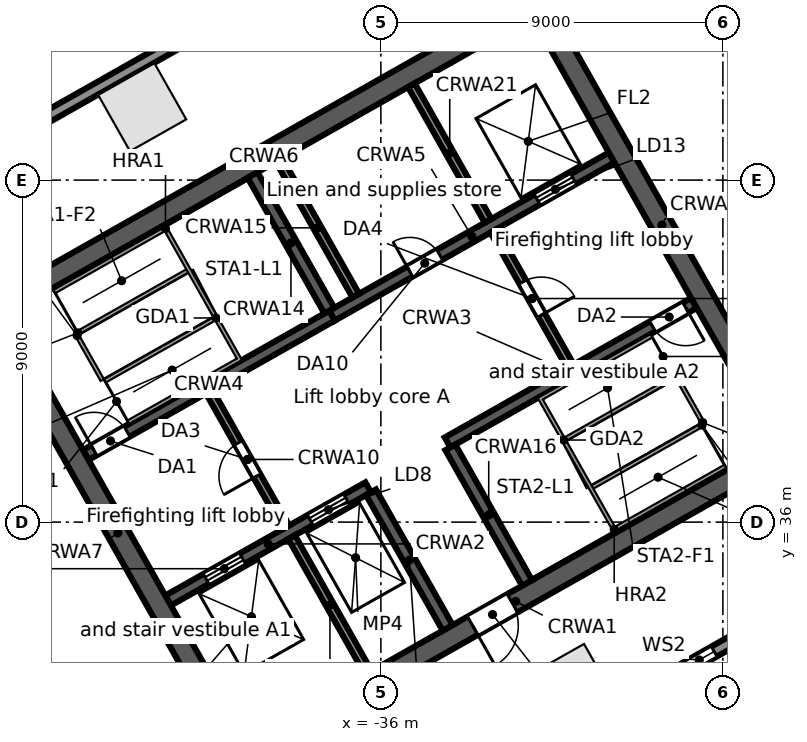
"""IFC4 building model, lengths in metres.
Left out: names, types, materials, properties, quantities, classifications, styles, units other than length and angle.
Written with IfcOpenShell. Run it as: python <this file> out.ifc"""

import sys

from ifc_helpers import new_model, si_unit, direction, frame, frame_2d, origin, origin_2d, place, context, subcontext, project, spatial, rectangle, extrude, element, fill, save


model = new_model("IFC4")
c1 = context("Model", 3, precision=1e-05, world=origin(), true_north=direction((0.0, 1.0)))
c2 = subcontext(c1, "Body", "Model", "MODEL_VIEW")
j1 = project(units=[si_unit("LENGTHUNIT", "METRE"), si_unit("PLANEANGLEUNIT", "RADIAN")], contexts=[c1])
p1 = place(None, origin())
s1 = spatial("IfcSite", under=j1, at=p1, CompositionType="ELEMENT")
p2 = place(p1, origin())
s2 = spatial("IfcBuilding", under=s1, at=p2, CompositionType="ELEMENT")
p3 = place(p2, frame((0.0, 0.0, 136.7)))
s3 = spatial("IfcBuildingStorey", under=s2, at=p3, CompositionType="ELEMENT", Elevation=136.7)
for number, where, z_axis, x_axis in (
    (1, (-42.28, 46.919, 0.0), (0.0, 0.0, 1.0), (-0.87, -0.492, 0.0)),
    (2, (-30.976, 31.635, 0.0), (0.0, 0.0, 1.0), (0.87, 0.492, 0.0)),
):
    element("IfcColumn", number, at=place(p3, frame(where, z_axis=z_axis, x_axis=x_axis)), inside=s3, PredefinedType="COLUMN", context=c2, shape_type="SweptSolid", body=[
        extrude(rectangle(XDim=1.7, YDim=1.7, at=origin_2d()), origin(), (0.0, 0.0, 1.0), 4.4),
    ])
p4 = place(p3, frame((-58.745, 38.764, 0.0), z_axis=(0.0, 0.0, 1.0), x_axis=(0.870355811726, 0.492423355453, 0.0)))
e3 = element("IfcWall", 3, at=p4, inside=s3, PredefinedType="STANDARD", context=c2, shape_type="SweptSolid", body=[
    extrude(rectangle(XDim=64.025, YDim=0.3, at=frame_2d((32.013, 0.0))), origin(), (0.0, 0.0, 1.0), 4.08),
])
p5 = place(p4, frame((60.122, 0.0, 0.6)))
e4 = element("IfcOpeningElement", 4, at=p5, cuts=e3, PredefinedType="OPENING", context=c2, shape_type="SweptSolid", body=[
    extrude(rectangle(XDim=0.9, YDim=2.8, at=frame_2d((0.45, 1.4))), frame((0.0, 0.16, 0.0), z_axis=(0.0, -1.0, 0.0), x_axis=(1.0, 0.0, 0.0)), (0.0, 0.0, 1.0), 0.32),
])
p6 = place(p4, frame((50.992, 0.0, 0.6)))
e5 = element("IfcOpeningElement", 5, at=p6, cuts=e3, PredefinedType="OPENING", context=c2, shape_type="SweptSolid", body=[
    extrude(rectangle(XDim=0.9, YDim=2.8, at=frame_2d((0.45, 1.4))), frame((0.0, 0.16, 0.0), z_axis=(0.0, -1.0, 0.0), x_axis=(1.0, 0.0, 0.0)), (0.0, 0.0, 1.0), 0.32),
])
p7 = place(p4, frame((41.862, 0.0, 0.6)))
e6 = element("IfcOpeningElement", 6, at=p7, cuts=e3, PredefinedType="OPENING", context=c2, shape_type="SweptSolid", body=[
    extrude(rectangle(XDim=0.9, YDim=2.8, at=frame_2d((0.45, 1.4))), frame((0.0, 0.16, 0.0), z_axis=(0.0, -1.0, 0.0), x_axis=(1.0, 0.0, 0.0)), (0.0, 0.0, 1.0), 0.32),
])
p8 = place(p4, frame((32.732, 0.0, 0.6)))
e7 = element("IfcOpeningElement", 7, at=p8, cuts=e3, PredefinedType="OPENING", context=c2, shape_type="SweptSolid", body=[
    extrude(rectangle(XDim=0.9, YDim=2.8, at=frame_2d((0.45, 1.4))), frame((0.0, 0.16, 0.0), z_axis=(0.0, -1.0, 0.0), x_axis=(1.0, 0.0, 0.0)), (0.0, 0.0, 1.0), 0.32),
])
p9 = place(p4, frame((23.602, 0.0, 0.6)))
e8 = element("IfcOpeningElement", 8, at=p9, cuts=e3, PredefinedType="OPENING", context=c2, shape_type="SweptSolid", body=[
    extrude(rectangle(XDim=0.9, YDim=2.8, at=frame_2d((0.45, 1.4))), frame((0.0, 0.16, 0.0), z_axis=(0.0, -1.0, 0.0), x_axis=(1.0, 0.0, 0.0)), (0.0, 0.0, 1.0), 0.32),
])
p10 = place(p4, frame((14.472, 0.0, 0.6)))
e9 = element("IfcOpeningElement", 9, at=p10, cuts=e3, PredefinedType="OPENING", context=c2, shape_type="SweptSolid", body=[
    extrude(rectangle(XDim=0.9, YDim=2.8, at=frame_2d((0.45, 1.4))), frame((0.0, 0.16, 0.0), z_axis=(0.0, -1.0, 0.0), x_axis=(1.0, 0.0, 0.0)), (0.0, 0.0, 1.0), 0.32),
])
p11 = place(p4, frame((5.342, 0.0, 0.6)))
e10 = element("IfcOpeningElement", 10, at=p11, cuts=e3, PredefinedType="OPENING", context=c2, shape_type="SweptSolid", body=[
    extrude(rectangle(XDim=0.9, YDim=2.8, at=frame_2d((0.45, 1.4))), frame((0.0, 0.16, 0.0), z_axis=(0.0, -1.0, 0.0), x_axis=(1.0, 0.0, 0.0)), (0.0, 0.0, 1.0), 0.32),
])
p12 = place(p3, frame((-44.109, 26.504, 0.0), z_axis=(0.0, 0.0, 1.0), x_axis=(-0.857169502585, 0.515034410344, 0.0)))
e11 = element("IfcWall", 11, at=p12, inside=s3, PredefinedType="STANDARD", context=c2, shape_type="SweptSolid", body=[
    extrude(rectangle(XDim=17.127, YDim=0.3, at=frame_2d((8.563, 0.0))), origin(), (0.0, 0.0, 1.0), 4.08),
])
p13 = place(p12, frame((13.403, 0.0, 0.6)))
e12 = element("IfcOpeningElement", 12, at=p13, cuts=e11, PredefinedType="OPENING", context=c2, shape_type="SweptSolid", body=[
    extrude(rectangle(XDim=0.9, YDim=2.8, at=frame_2d((0.45, 1.4))), frame((0.0, 0.16, 0.0), z_axis=(0.0, -1.0, 0.0), x_axis=(1.0, 0.0, 0.0)), (0.0, 0.0, 1.0), 0.32),
])
p14 = place(p12, frame((4.903, 0.0, 0.6)))
e13 = element("IfcOpeningElement", 13, at=p14, cuts=e11, PredefinedType="OPENING", context=c2, shape_type="SweptSolid", body=[
    extrude(rectangle(XDim=0.9, YDim=2.8, at=frame_2d((0.45, 1.4))), frame((0.0, 0.16, 0.0), z_axis=(0.0, -1.0, 0.0), x_axis=(1.0, 0.0, 0.0)), (0.0, 0.0, 1.0), 0.32),
])
p15 = place(p3, frame((-0.055, 47.969, 0.0), z_axis=(0.0, 0.0, 1.0), x_axis=(-0.870355730478, -0.492423499058, 0.0)))
e14 = element("IfcWall", 14, at=p15, inside=s3, PredefinedType="STANDARD", context=c2, shape_type="SweptSolid", body=[
    extrude(rectangle(XDim=43.75, YDim=0.3, at=frame_2d((21.875, 0.0))), origin(), (0.0, 0.0, 1.0), 4.08),
])
p16 = place(p15, frame((39.977, 0.0, 0.6)))
e15 = element("IfcOpeningElement", 15, at=p16, cuts=e14, PredefinedType="OPENING", context=c2, shape_type="SweptSolid", body=[
    extrude(rectangle(XDim=0.9, YDim=2.8, at=frame_2d((0.45, 1.4))), frame((0.0, 0.16, 0.0), z_axis=(0.0, -1.0, 0.0), x_axis=(1.0, 0.0, 0.0)), (0.0, 0.0, 1.0), 0.32),
])
p17 = place(p15, frame((31.222, 0.0, 0.6)))
e16 = element("IfcOpeningElement", 16, at=p17, cuts=e14, PredefinedType="OPENING", context=c2, shape_type="SweptSolid", body=[
    extrude(rectangle(XDim=0.9, YDim=2.8, at=frame_2d((0.45, 1.4))), frame((0.0, 0.16, 0.0), z_axis=(0.0, -1.0, 0.0), x_axis=(1.0, 0.0, 0.0)), (0.0, 0.0, 1.0), 0.32),
])
p18 = place(p15, frame((22.468, 0.0, 0.6)))
e17 = element("IfcOpeningElement", 17, at=p18, cuts=e14, PredefinedType="OPENING", context=c2, shape_type="SweptSolid", body=[
    extrude(rectangle(XDim=0.9, YDim=2.8, at=frame_2d((0.45, 1.4))), frame((0.0, 0.16, 0.0), z_axis=(0.0, -1.0, 0.0), x_axis=(1.0, 0.0, 0.0)), (0.0, 0.0, 1.0), 0.32),
])
p19 = place(p15, frame((13.713, 0.0, 0.6)))
e18 = element("IfcOpeningElement", 18, at=p19, cuts=e14, PredefinedType="OPENING", context=c2, shape_type="SweptSolid", body=[
    extrude(rectangle(XDim=0.9, YDim=2.8, at=frame_2d((0.45, 1.4))), frame((0.0, 0.16, 0.0), z_axis=(0.0, -1.0, 0.0), x_axis=(1.0, 0.0, 0.0)), (0.0, 0.0, 1.0), 0.32),
])
p20 = place(p15, frame((4.959, 0.0, 0.6)))
e19 = element("IfcOpeningElement", 19, at=p20, cuts=e14, PredefinedType="OPENING", context=c2, shape_type="SweptSolid", body=[
    extrude(rectangle(XDim=0.9, YDim=2.8, at=frame_2d((0.45, 1.4))), frame((0.0, 0.16, 0.0), z_axis=(0.0, -1.0, 0.0), x_axis=(1.0, 0.0, 0.0)), (0.0, 0.0, 1.0), 0.32),
])
p21 = place(p3, frame((-39.85, 29.727, 0.0), z_axis=(0.0, 0.0, 1.0), x_axis=(0.870359753402, 0.492416388494, 0.0)))
e20 = element("IfcWall", 20, at=p21, inside=s3, PredefinedType="SOLIDWALL", context=c2, shape_type="SweptSolid", body=[
    extrude(rectangle(XDim=17.0, YDim=0.55, at=frame_2d((8.5, 0.0))), origin(), (0.0, 0.0, 1.0), 4.08),
])
p22 = place(p21, frame((7.2, 0.0, 0.0)))
e21 = element("IfcOpeningElement", 21, at=p22, cuts=e20, PredefinedType="OPENING", context=c2, shape_type="SweptSolid", body=[
    extrude(rectangle(XDim=1.2, YDim=2.1, at=frame_2d((0.6, 1.05))), frame((0.0, 0.285, 0.0), z_axis=(0.0, -1.0, 0.0), x_axis=(1.0, 0.0, 0.0)), (0.0, 0.0, 1.0), 0.57),
])
p23 = place(p3, frame((-41.6, 33.936, 0.0), z_axis=(0.0, 0.0, 1.0), x_axis=(0.870348557882, 0.492436176365, 0.0)))
e22 = element("IfcWall", 22, at=p23, inside=s3, PredefinedType="SOLIDWALL", context=c2, shape_type="SweptSolid", body=[
    extrude(rectangle(XDim=6.05, YDim=0.3, at=frame_2d((3.025, 0.0))), origin(), (0.0, 0.0, 1.0), 4.08),
])
p24 = place(p23, frame((1.15, 0.0, 0.0)))
e23 = element("IfcOpeningElement", 23, at=p24, cuts=e22, PredefinedType="OPENING", context=c2, shape_type="SweptSolid", body=[
    extrude(rectangle(XDim=1.1, YDim=2.1, at=frame_2d((0.55, 1.05))), frame((0.0, 0.16, 0.0), z_axis=(0.0, -1.0, 0.0), x_axis=(1.0, 0.0, 0.0)), (0.0, 0.0, 1.0), 0.32),
])
p25 = place(p23, frame((4.3, 0.0, 0.0)))
e24 = element("IfcOpeningElement", 24, at=p25, cuts=e22, PredefinedType="OPENING", context=c2, shape_type="SweptSolid", body=[
    extrude(rectangle(XDim=1.1, YDim=2.1, at=frame_2d((0.55, 1.05))), frame((0.0, 0.16, 0.0), z_axis=(0.0, -1.0, 0.0), x_axis=(1.0, 0.0, 0.0)), (0.0, 0.0, 1.0), 0.32),
])
p26 = place(p3, frame((-34.245, 38.097, 0.0), z_axis=(0.0, 0.0, 1.0), x_axis=(0.870360741098, 0.49241464271, 0.0)))
e25 = element("IfcWall", 25, at=p26, inside=s3, PredefinedType="SOLIDWALL", context=c2, shape_type="SweptSolid", body=[
    extrude(rectangle(XDim=7.45, YDim=0.3, at=frame_2d((3.725, 0.0))), origin(), (0.0, 0.0, 1.0), 4.08),
])
p27 = place(p26, frame((6.2, 0.0, 0.0)))
e26 = element("IfcOpeningElement", 26, at=p27, cuts=e25, PredefinedType="OPENING", context=c2, shape_type="SweptSolid", body=[
    extrude(rectangle(XDim=1.0, YDim=2.1, at=frame_2d((0.5, 1.05))), frame((0.0, 0.16, 0.0), z_axis=(0.0, -1.0, 0.0), x_axis=(1.0, 0.0, 0.0)), (0.0, 0.0, 1.0), 0.32),
])
p28 = place(p3, frame((-43.766, 37.766, 0.0), z_axis=(0.0, 0.0, 1.0), x_axis=(0.870346696097, 0.492439466932, 0.0)))
e27 = element("IfcWall", 27, at=p28, inside=s3, PredefinedType="SOLIDWALL", context=c2, shape_type="SweptSolid", body=[
    extrude(rectangle(XDim=7.45, YDim=0.3, at=frame_2d((3.725, 0.0))), origin(), (0.0, 0.0, 1.0), 4.08),
])
p29 = place(p28, frame((0.25, 0.0, 0.0)))
e28 = element("IfcOpeningElement", 28, at=p29, cuts=e27, PredefinedType="OPENING", context=c2, shape_type="SweptSolid", body=[
    extrude(rectangle(XDim=1.0, YDim=2.1, at=frame_2d((0.5, 1.05))), frame((0.0, 0.16, 0.0), z_axis=(0.0, -1.0, 0.0), x_axis=(1.0, 0.0, 0.0)), (0.0, 0.0, 1.0), 0.32),
])
p30 = place(p3, frame((-37.282, 41.435, 0.0), z_axis=(0.0, 0.0, 1.0), x_axis=(0.870359895813, 0.492416136779, 0.0)))
e29 = element("IfcWall", 29, at=p30, inside=s3, PredefinedType="SOLIDWALL", context=c2, shape_type="SweptSolid", body=[
    extrude(rectangle(XDim=8.45, YDim=0.3, at=frame_2d((4.225, 0.0))), origin(), (0.0, 0.0, 1.0), 4.08),
])
p31 = place(p30, frame((6.2, 0.0, 0.0)))
e30 = element("IfcOpeningElement", 30, at=p31, cuts=e29, PredefinedType="OPENING", context=c2, shape_type="SweptSolid", body=[
    extrude(rectangle(XDim=1.1, YDim=2.1, at=frame_2d((0.55, 1.05))), frame((0.0, 0.16, 0.0), z_axis=(0.0, -1.0, 0.0), x_axis=(1.0, 0.0, 0.0)), (0.0, 0.0, 1.0), 0.32),
])
p32 = place(p30, frame((2.35, 0.0, 0.0)))
e31 = element("IfcOpeningElement", 31, at=p32, cuts=e29, PredefinedType="OPENING", context=c2, shape_type="SweptSolid", body=[
    extrude(rectangle(XDim=0.9, YDim=2.1, at=frame_2d((0.45, 1.05))), frame((0.0, 0.16, 0.0), z_axis=(0.0, -1.0, 0.0), x_axis=(1.0, 0.0, 0.0)), (0.0, 0.0, 1.0), 0.32),
])
p33 = place(p3, frame((-46.473, 41.434, 0.0), z_axis=(0.0, 0.0, 1.0), x_axis=(0.870359753402, 0.492416388494, 0.0)))
e32 = element("IfcWall", 32, at=p33, inside=s3, PredefinedType="SOLIDWALL", context=c2, shape_type="SweptSolid", body=[
    extrude(rectangle(XDim=17.0, YDim=0.55, at=frame_2d((8.5, 0.0))), origin(), (0.0, 0.0, 1.0), 4.08),
])
p34 = place(p3, frame((-46.098, 41.33, 0.0), z_axis=(0.0, 0.0, 1.0), x_axis=(0.492418910884, -0.870358326325, 0.0)))
e33 = element("IfcWall", 33, at=p34, inside=s3, PredefinedType="SOLIDWALL", context=c2, shape_type="SweptSolid", body=[
    extrude(rectangle(XDim=12.9, YDim=0.55, at=frame_2d((6.45, 0.0))), origin(), (0.0, 0.0, 1.0), 4.08),
])
p35 = place(p3, frame((-38.349, 35.603, 0.0), z_axis=(0.0, 0.0, 1.0), x_axis=(0.492382931784, -0.870378681085, 0.0)))
e34 = element("IfcWall", 34, at=p35, inside=s3, PredefinedType="SOLIDWALL", context=c2, shape_type="SweptSolid", body=[
    extrude(rectangle(XDim=4.1, YDim=0.2, at=frame_2d((2.05, 0.0))), origin(), (0.0, 0.0, 1.0), 4.08),
])
p36 = place(p3, frame((-40.516, 39.433, 0.0), z_axis=(0.0, 0.0, 1.0), x_axis=(0.492453559952, -0.87033872216, 0.0)))
e35 = element("IfcWall", 35, at=p36, inside=s3, PredefinedType="PARTITIONING", context=c2, shape_type="SweptSolid", body=[
    extrude(rectangle(XDim=4.1, YDim=0.2, at=frame_2d((2.05, 0.0))), origin(), (0.0, 0.0, 1.0), 4.08),
])
p37 = place(p36, frame((1.55, 0.0, 0.0)))
e36 = element("IfcOpeningElement", 36, at=p37, cuts=e35, PredefinedType="OPENING", context=c2, shape_type="SweptSolid", body=[
    extrude(rectangle(XDim=1.0, YDim=2.1, at=frame_2d((0.5, 1.05))), frame((0.0, 0.11, 0.0), z_axis=(0.0, -1.0, 0.0), x_axis=(1.0, 0.0, 0.0)), (0.0, 0.0, 1.0), 0.22),
])
p38 = place(p3, frame((-36.26, 36.785, 0.0), z_axis=(0.0, 0.0, 1.0), x_axis=(0.492408451753, -0.87036424366, 0.0)))
e37 = element("IfcWall", 37, at=p38, inside=s3, PredefinedType="SOLIDWALL", context=c2, shape_type="SweptSolid", body=[
    extrude(rectangle(XDim=4.1, YDim=0.3, at=frame_2d((2.05, 0.0))), origin(), (0.0, 0.0, 1.0), 4.08),
])
p39 = place(p3, frame((-39.375, 45.134, 0.0), z_axis=(0.0, 0.0, 1.0), x_axis=(0.492428039142, -0.870353161807, 0.0)))
e38 = element("IfcWall", 38, at=p39, inside=s3, PredefinedType="SOLIDWALL", context=c2, shape_type="SweptSolid", body=[
    extrude(rectangle(XDim=4.1, YDim=0.3, at=frame_2d((2.05, 0.0))), origin(), (0.0, 0.0, 1.0), 4.08),
])
p40 = place(p3, frame((-38.679, 45.527, 0.0), z_axis=(0.0, 0.0, 1.0), x_axis=(0.492453559952, -0.87033872216, 0.0)))
e39 = element("IfcWall", 39, at=p40, inside=s3, PredefinedType="SOLIDWALL", context=c2, shape_type="SweptSolid", body=[
    extrude(rectangle(XDim=4.1, YDim=0.2, at=frame_2d((2.05, 0.0))), origin(), (0.0, 0.0, 1.0), 4.08),
])
p41 = place(p3, frame((-34.171, 37.967, 0.0), z_axis=(0.0, 0.0, 1.0), x_axis=(0.492382931784, -0.870378681085, 0.0)))
e40 = element("IfcWall", 40, at=p41, inside=s3, PredefinedType="SOLIDWALL", context=c2, shape_type="SweptSolid", body=[
    extrude(rectangle(XDim=4.1, YDim=0.3, at=frame_2d((2.05, 0.0))), origin(), (0.0, 0.0, 1.0), 4.08),
])
p42 = place(p3, frame((-33.031, 43.667, 0.0), z_axis=(0.0, 0.0, 1.0), x_axis=(0.492408451753, -0.87036424366, 0.0)))
e41 = element("IfcWall", 41, at=p42, inside=s3, PredefinedType="PARTITIONING", context=c2, shape_type="SweptSolid", body=[
    extrude(rectangle(XDim=4.1, YDim=0.2, at=frame_2d((2.05, 0.0))), origin(), (0.0, 0.0, 1.0), 4.08),
])
p43 = place(p42, frame((1.55, 0.0, 0.0)))
e42 = element("IfcOpeningElement", 42, at=p43, cuts=e41, PredefinedType="OPENING", context=c2, shape_type="SweptSolid", body=[
    extrude(rectangle(XDim=1.0, YDim=2.1, at=frame_2d((0.5, 1.05))), frame((0.0, 0.11, 0.0), z_axis=(0.0, -1.0, 0.0), x_axis=(1.0, 0.0, 0.0)), (0.0, 0.0, 1.0), 0.22),
])
p44 = place(p3, frame((-35.197, 47.497, 0.0), z_axis=(0.0, 0.0, 1.0), x_axis=(0.492453559952, -0.87033872216, 0.0)))
e43 = element("IfcWall", 43, at=p44, inside=s3, PredefinedType="SOLIDWALL", context=c2, shape_type="SweptSolid", body=[
    extrude(rectangle(XDim=4.1, YDim=0.2, at=frame_2d((2.05, 0.0))), origin(), (0.0, 0.0, 1.0), 4.08),
])
p45 = place(p3, frame((-31.781, 49.43, 0.0), z_axis=(0.0, 0.0, 1.0), x_axis=(0.492427022044, -0.870353737259, 0.0)))
e44 = element("IfcWall", 44, at=p45, inside=s3, PredefinedType="SOLIDWALL", context=c2, shape_type="SweptSolid", body=[
    extrude(rectangle(XDim=12.9, YDim=0.55, at=frame_2d((6.45, 0.0))), origin(), (0.0, 0.0, 1.0), 4.08),
])
p46 = place(p17, origin())
e45 = element("IfcWindow", 45, at=p46, inside=s3, PartitioningType="SINGLE_PANEL", PredefinedType="WINDOW", context=c2, shape_type="SweptSolid", body=[
    extrude(rectangle(XDim=0.9, YDim=2.8, at=frame_2d((0.45, 1.4))), frame((0.0, 0.03, 0.0), z_axis=(0.0, -1.0, 0.0), x_axis=(1.0, 0.0, 0.0)), (0.0, 0.0, 1.0), 0.06),
])
fill(e16, e45)
p47 = place(p31, origin())
e46 = element("IfcDoor", 46, at=p47, inside=s3, OperationType="DOUBLE_DOOR_SLIDING", PredefinedType="DOOR", context=c2, shape_type="SweptSolid", body=[
    extrude(rectangle(XDim=1.1, YDim=2.1, at=frame_2d((0.55, 1.05))), frame((0.0, 0.025, 0.0), z_axis=(0.0, -1.0, 0.0), x_axis=(1.0, 0.0, 0.0)), (0.0, 0.0, 1.0), 0.05),
])
fill(e30, e46)
p48 = place(p24, origin())
e47 = element("IfcDoor", 47, at=p48, inside=s3, OperationType="DOUBLE_DOOR_SLIDING", PredefinedType="DOOR", context=c2, shape_type="SweptSolid", body=[
    extrude(rectangle(XDim=1.1, YDim=2.1, at=frame_2d((0.55, 1.05))), frame((0.0, 0.025, 0.0), z_axis=(0.0, -1.0, 0.0), x_axis=(1.0, 0.0, 0.0)), (0.0, 0.0, 1.0), 0.05),
])
fill(e23, e47)
p49 = place(p25, origin())
e48 = element("IfcDoor", 48, at=p49, inside=s3, OperationType="DOUBLE_DOOR_SLIDING", PredefinedType="DOOR", context=c2, shape_type="SweptSolid", body=[
    extrude(rectangle(XDim=1.1, YDim=2.1, at=frame_2d((0.55, 1.05))), frame((0.0, 0.025, 0.0), z_axis=(0.0, -1.0, 0.0), x_axis=(1.0, 0.0, 0.0)), (0.0, 0.0, 1.0), 0.05),
])
fill(e24, e48)
p50 = place(p29, origin())
e49 = element("IfcDoor", 49, at=p50, inside=s3, OperationType="SINGLE_SWING_LEFT", PredefinedType="DOOR", context=c2, shape_type="SweptSolid", body=[
    extrude(rectangle(XDim=1.0, YDim=2.1, at=frame_2d((0.5, 1.05))), frame((0.0, 0.025, 0.0), z_axis=(0.0, -1.0, 0.0), x_axis=(1.0, 0.0, 0.0)), (0.0, 0.0, 1.0), 0.05),
])
fill(e28, e49)
p51 = place(p27, frame((1.0, 0.0, 0.0), z_axis=(0.0, 0.0, 1.0), x_axis=(-1.0, 0.0, 0.0)))
e50 = element("IfcDoor", 50, at=p51, inside=s3, OperationType="SINGLE_SWING_LEFT", PredefinedType="DOOR", context=c2, shape_type="SweptSolid", body=[
    extrude(rectangle(XDim=1.0, YDim=2.1, at=frame_2d((0.5, 1.05))), frame((0.0, 0.025, 0.0), z_axis=(0.0, -1.0, 0.0), x_axis=(1.0, 0.0, 0.0)), (0.0, 0.0, 1.0), 0.05),
])
fill(e26, e50)
p52 = place(p37, frame((1.0, 0.0, 0.0), z_axis=(0.0, 0.0, 1.0), x_axis=(-1.0, 0.0, 0.0)))
e51 = element("IfcDoor", 51, at=p52, inside=s3, OperationType="SINGLE_SWING_LEFT", PredefinedType="DOOR", context=c2, shape_type="SweptSolid", body=[
    extrude(rectangle(XDim=1.0, YDim=2.1, at=frame_2d((0.5, 1.05))), frame((0.0, 0.025, 0.0), z_axis=(0.0, -1.0, 0.0), x_axis=(1.0, 0.0, 0.0)), (0.0, 0.0, 1.0), 0.05),
])
fill(e36, e51)
p53 = place(p43, origin())
e52 = element("IfcDoor", 52, at=p53, inside=s3, OperationType="SINGLE_SWING_RIGHT", PredefinedType="DOOR", context=c2, shape_type="SweptSolid", body=[
    extrude(rectangle(XDim=1.0, YDim=2.1, at=frame_2d((0.5, 1.05))), frame((0.0, 0.025, 0.0), z_axis=(0.0, -1.0, 0.0), x_axis=(1.0, 0.0, 0.0)), (0.0, 0.0, 1.0), 0.05),
])
fill(e42, e52)
p54 = place(p22, frame((1.2, 0.0, 0.0), z_axis=(0.0, 0.0, 1.0), x_axis=(-1.0, 0.0, 0.0)))
e53 = element("IfcDoor", 53, at=p54, inside=s3, OperationType="SINGLE_SWING_RIGHT", PredefinedType="DOOR", context=c2, shape_type="SweptSolid", body=[
    extrude(rectangle(XDim=1.2, YDim=2.1, at=frame_2d((0.6, 1.05))), frame((0.0, 0.025, 0.0), z_axis=(0.0, -1.0, 0.0), x_axis=(1.0, 0.0, 0.0)), (0.0, 0.0, 1.0), 0.05),
])
fill(e21, e53)
p55 = place(p32, origin())
e54 = element("IfcDoor", 54, at=p55, inside=s3, OperationType="SINGLE_SWING_LEFT", PredefinedType="DOOR", context=c2, shape_type="SweptSolid", body=[
    extrude(rectangle(XDim=0.9, YDim=2.1, at=frame_2d((0.45, 1.05))), frame((0.0, 0.025, 0.0), z_axis=(0.0, -1.0, 0.0), x_axis=(1.0, 0.0, 0.0)), (0.0, 0.0, 1.0), 0.05),
])
fill(e31, e54)
save(model, sys.argv[1])
